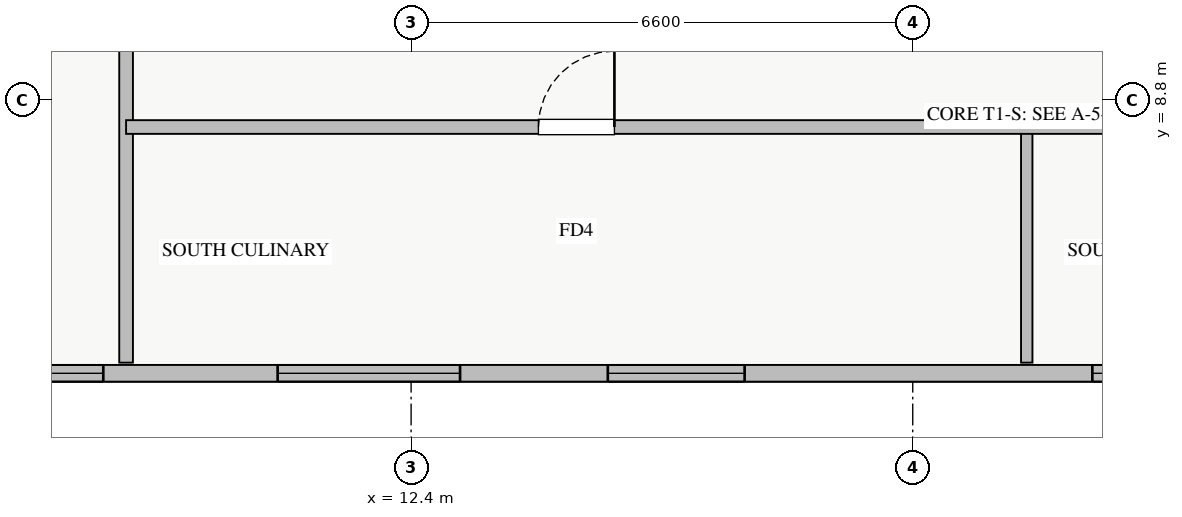
"""IFC4 building model, lengths in metres.
Left out: names, types, materials, properties, quantities, classifications, styles, units other than length and angle.
Written with IfcOpenShell. Run it as: python <this file> out.ifc"""

import sys

from ifc_helpers import new_model, si_unit, direction, frame, frame_2d, origin, place, context, subcontext, project, spatial, rectangle, extrude, source, transform, mapped, element, fill, save


model = new_model("IFC4")
c1 = context("Model", 3, precision=1e-05, world=origin(), true_north=direction((0.0, 1.0)))
c2 = subcontext(c1, "Body", "Model", "MODEL_VIEW")
j1 = project(units=[si_unit("LENGTHUNIT", "METRE"), si_unit("PLANEANGLEUNIT", "RADIAN")], contexts=[c1])
p1 = place(None, origin())
s1 = spatial("IfcSite", under=j1, at=p1, CompositionType="ELEMENT")
p2 = place(p1, origin())
s2 = spatial("IfcBuilding", under=s1, at=p2, CompositionType="ELEMENT")
p3 = place(p2, frame((0.0, 0.0, 169.75)))
s3 = spatial("IfcBuildingStorey", under=s2, at=p3, CompositionType="ELEMENT", Elevation=169.75)
p4 = place(p3, frame((6.55, 5.21, 0.0), z_axis=(0.0, 0.0, 1.0), x_axis=(1.0, 0.0, 0.0)))
e1 = element("IfcWall", 1, at=p4, inside=s3, PredefinedType="STANDARD", context=c2, shape_type="SweptSolid", body=[
    extrude(rectangle(XDim=24.9, YDim=0.22, at=frame_2d((12.45, 0.0))), origin(), (0.0, 0.0, 1.0), 2.54),
])
p5 = place(p4, frame((0.3, 0.0, 0.9)))
e2 = element("IfcOpeningElement", 2, at=p5, cuts=e1, PredefinedType="OPENING", context=c2, shape_type="SweptSolid", body=[
    extrude(rectangle(XDim=1.5, YDim=1.5, at=frame_2d((0.75, 0.75))), frame((0.0, 0.12, 0.0), z_axis=(0.0, -1.0, 0.0), x_axis=(1.0, 0.0, 0.0)), (0.0, 0.0, 1.0), 0.24),
])
p6 = place(p4, frame((8.438, 0.0, 0.9)))
e3 = element("IfcOpeningElement", 3, at=p6, cuts=e1, PredefinedType="OPENING", context=c2, shape_type="SweptSolid", body=[
    extrude(rectangle(XDim=1.8, YDim=1.45, at=frame_2d((0.9, 0.725))), frame((0.0, 0.12, 0.0), z_axis=(0.0, -1.0, 0.0), x_axis=(1.0, 0.0, 0.0)), (0.0, 0.0, 1.0), 0.24),
])
p7 = place(p4, frame((14.813, 0.0, 0.9)))
e4 = element("IfcOpeningElement", 4, at=p7, cuts=e1, PredefinedType="OPENING", context=c2, shape_type="SweptSolid", body=[
    extrude(rectangle(XDim=1.5, YDim=1.45, at=frame_2d((0.75, 0.725))), frame((0.0, 0.12, 0.0), z_axis=(0.0, -1.0, 0.0), x_axis=(1.0, 0.0, 0.0)), (0.0, 0.0, 1.0), 0.24),
])
p8 = place(p4, frame((20.738, 0.0, 0.9)))
e5 = element("IfcOpeningElement", 5, at=p8, cuts=e1, PredefinedType="OPENING", context=c2, shape_type="SweptSolid", body=[
    extrude(rectangle(XDim=2.1, YDim=1.46, at=frame_2d((1.05, 0.73))), frame((0.0, 0.12, 0.0), z_axis=(0.0, -1.0, 0.0), x_axis=(1.0, 0.0, 0.0)), (0.0, 0.0, 1.0), 0.24),
])
p9 = place(p4, frame((4.094, 0.0, 0.9)))
e6 = element("IfcOpeningElement", 6, at=p9, cuts=e1, PredefinedType="OPENING", context=c2, shape_type="SweptSolid", body=[
    extrude(rectangle(XDim=2.4, YDim=1.5, at=frame_2d((1.2, 0.75))), frame((0.0, 0.12, 0.0), z_axis=(0.0, -1.0, 0.0), x_axis=(1.0, 0.0, 0.0)), (0.0, 0.0, 1.0), 0.24),
])
p10 = place(p3, frame((8.65, 5.35, 0.0), z_axis=(0.0, 0.0, 1.0), x_axis=(0.0, 1.0, 0.0)))
e7 = element("IfcWall", 7, at=p10, inside=s3, PredefinedType="PARTITIONING", context=c2, shape_type="SweptSolid", body=[
    extrude(rectangle(XDim=11.35, YDim=0.18, at=frame_2d((5.675, 0.0))), origin(), (0.0, 0.0, 1.0), 3.0),
])
p11 = place(p10, frame((4.6, 0.0, 0.0)))
e8 = element("IfcOpeningElement", 8, at=p11, cuts=e7, PredefinedType="OPENING", context=c2, shape_type="SweptSolid", body=[
    extrude(rectangle(XDim=1.0, YDim=2.05, at=frame_2d((0.5, 1.025))), frame((0.0, 0.1, 0.0), z_axis=(0.0, -1.0, 0.0), x_axis=(1.0, 0.0, 0.0)), (0.0, 0.0, 1.0), 0.2),
])
p12 = place(p10, frame((8.8, 0.0, 0.0)))
e9 = element("IfcOpeningElement", 9, at=p12, cuts=e7, PredefinedType="OPENING", context=c2, shape_type="SweptSolid", body=[
    extrude(rectangle(XDim=1.0, YDim=2.05, at=frame_2d((0.5, 1.025))), frame((0.0, 0.1, 0.0), z_axis=(0.0, -1.0, 0.0), x_axis=(1.0, 0.0, 0.0)), (0.0, 0.0, 1.0), 0.2),
])
p13 = place(p3, frame((20.5, 5.35, 0.0), z_axis=(0.0, 0.0, 1.0), x_axis=(0.0, 1.0, 0.0)))
e10 = element("IfcWall", 10, at=p13, inside=s3, PredefinedType="PARTITIONING", context=c2, shape_type="SweptSolid", body=[
    extrude(rectangle(XDim=3.1, YDim=0.15, at=frame_2d((1.55, 0.0))), origin(), (0.0, 0.0, 1.0), 3.0),
])
p14 = place(p3, frame((8.65, 8.45, 0.0), z_axis=(0.0, 0.0, 1.0), x_axis=(1.0, 0.0, 0.0)))
e11 = element("IfcWall", 11, at=p14, inside=s3, PredefinedType="PARTITIONING", context=c2, shape_type="SweptSolid", body=[
    extrude(rectangle(XDim=23.8, YDim=0.18, at=frame_2d((11.9, 0.0))), origin(), (0.0, 0.0, 1.0), 3.0),
])
p15 = place(p14, frame((5.425, 0.0, 0.0)))
e12 = element("IfcOpeningElement", 12, at=p15, cuts=e11, PredefinedType="OPENING", context=c2, shape_type="SweptSolid", body=[
    extrude(rectangle(XDim=1.0, YDim=2.05, at=frame_2d((0.5, 1.025))), frame((0.0, 0.1, 0.0), z_axis=(0.0, -1.0, 0.0), x_axis=(1.0, 0.0, 0.0)), (0.0, 0.0, 1.0), 0.2),
])
p16 = place(p14, frame((17.325, 0.0, 0.0)))
e13 = element("IfcOpeningElement", 13, at=p16, cuts=e11, PredefinedType="OPENING", context=c2, shape_type="SweptSolid", body=[
    extrude(rectangle(XDim=1.0, YDim=2.05, at=frame_2d((0.5, 1.025))), frame((0.0, 0.1, 0.0), z_axis=(0.0, -1.0, 0.0), x_axis=(1.0, 0.0, 0.0)), (0.0, 0.0, 1.0), 0.2),
])
m1 = source(origin(), c2, "Body", "SweptSolid", [
    extrude(rectangle(XDim=1.5, YDim=1.5, at=frame_2d((0.75, 0.75))), frame((0.0, 0.03, 0.0), z_axis=(0.0, -1.0, 0.0), x_axis=(1.0, 0.0, 0.0)), (0.0, 0.0, 1.0), 0.06),
])
p17 = place(p5, origin())
e14 = element("IfcWindow", 14, at=p17, inside=s3, PartitioningType="TRIPLE_PANEL_VERTICAL", PredefinedType="WINDOW", context=c2, shape_type="MappedRepresentation", body=[
    mapped(m1, transform((0.0, 0.0, 0.0), x_axis=(1.0, 0.0, 0.0), y_axis=(0.0, 1.0, 0.0), z_axis=(0.0, 0.0, 1.0), scale=1.0)),
])
fill(e2, e14)
m2 = source(origin(), c2, "Body", "SweptSolid", [
    extrude(rectangle(XDim=1.8, YDim=1.45, at=frame_2d((0.9, 0.725))), frame((0.0, 0.03, 0.0), z_axis=(0.0, -1.0, 0.0), x_axis=(1.0, 0.0, 0.0)), (0.0, 0.0, 1.0), 0.06),
])
p18 = place(p6, origin())
e15 = element("IfcWindow", 15, at=p18, inside=s3, PartitioningType="DOUBLE_PANEL_VERTICAL", PredefinedType="WINDOW", context=c2, shape_type="MappedRepresentation", body=[
    mapped(m2, transform((0.0, 0.0, 0.0), x_axis=(1.0, 0.0, 0.0), y_axis=(0.0, 1.0, 0.0), z_axis=(0.0, 0.0, 1.0), scale=1.0)),
])
fill(e3, e15)
m3 = source(origin(), c2, "Body", "SweptSolid", [
    extrude(rectangle(XDim=1.5, YDim=1.45, at=frame_2d((0.75, 0.725))), frame((0.0, 0.03, 0.0), z_axis=(0.0, -1.0, 0.0), x_axis=(1.0, 0.0, 0.0)), (0.0, 0.0, 1.0), 0.06),
])
p19 = place(p7, origin())
e16 = element("IfcWindow", 16, at=p19, inside=s3, PartitioningType="DOUBLE_PANEL_VERTICAL", PredefinedType="WINDOW", context=c2, shape_type="MappedRepresentation", body=[
    mapped(m3, transform((0.0, 0.0, 0.0), x_axis=(1.0, 0.0, 0.0), y_axis=(0.0, 1.0, 0.0), z_axis=(0.0, 0.0, 1.0), scale=1.0)),
])
fill(e4, e16)
m4 = source(origin(), c2, "Body", "SweptSolid", [
    extrude(rectangle(XDim=1.0, YDim=2.05, at=frame_2d((0.5, 1.025))), frame((0.0, 0.025, 0.0), z_axis=(0.0, -1.0, 0.0), x_axis=(1.0, 0.0, 0.0)), (0.0, 0.0, 1.0), 0.05),
])
p20 = place(p15, origin())
e17 = element("IfcDoor", 17, at=p20, inside=s3, OperationType="SINGLE_SWING_RIGHT", PredefinedType="DOOR", context=c2, shape_type="MappedRepresentation", body=[
    mapped(m4, transform((0.0, 0.0, 0.0), x_axis=(1.0, 0.0, 0.0), y_axis=(0.0, 1.0, 0.0), z_axis=(0.0, 0.0, 1.0), scale=1.0)),
])
fill(e12, e17)
m5 = source(origin(), c2, "Body", "SweptSolid", [
    extrude(rectangle(XDim=2.4, YDim=1.5, at=frame_2d((1.2, 0.75))), frame((0.0, 0.03, 0.0), z_axis=(0.0, -1.0, 0.0), x_axis=(1.0, 0.0, 0.0)), (0.0, 0.0, 1.0), 0.06),
])
p21 = place(p9, origin())
e18 = element("IfcWindow", 18, at=p21, inside=s3, PartitioningType="TRIPLE_PANEL_VERTICAL", PredefinedType="WINDOW", context=c2, shape_type="MappedRepresentation", body=[
    mapped(m5, transform((0.0, 0.0, 0.0), x_axis=(1.0, 0.0, 0.0), y_axis=(0.0, 1.0, 0.0), z_axis=(0.0, 0.0, 1.0), scale=1.0)),
])
fill(e6, e18)
save(model, sys.argv[1])
